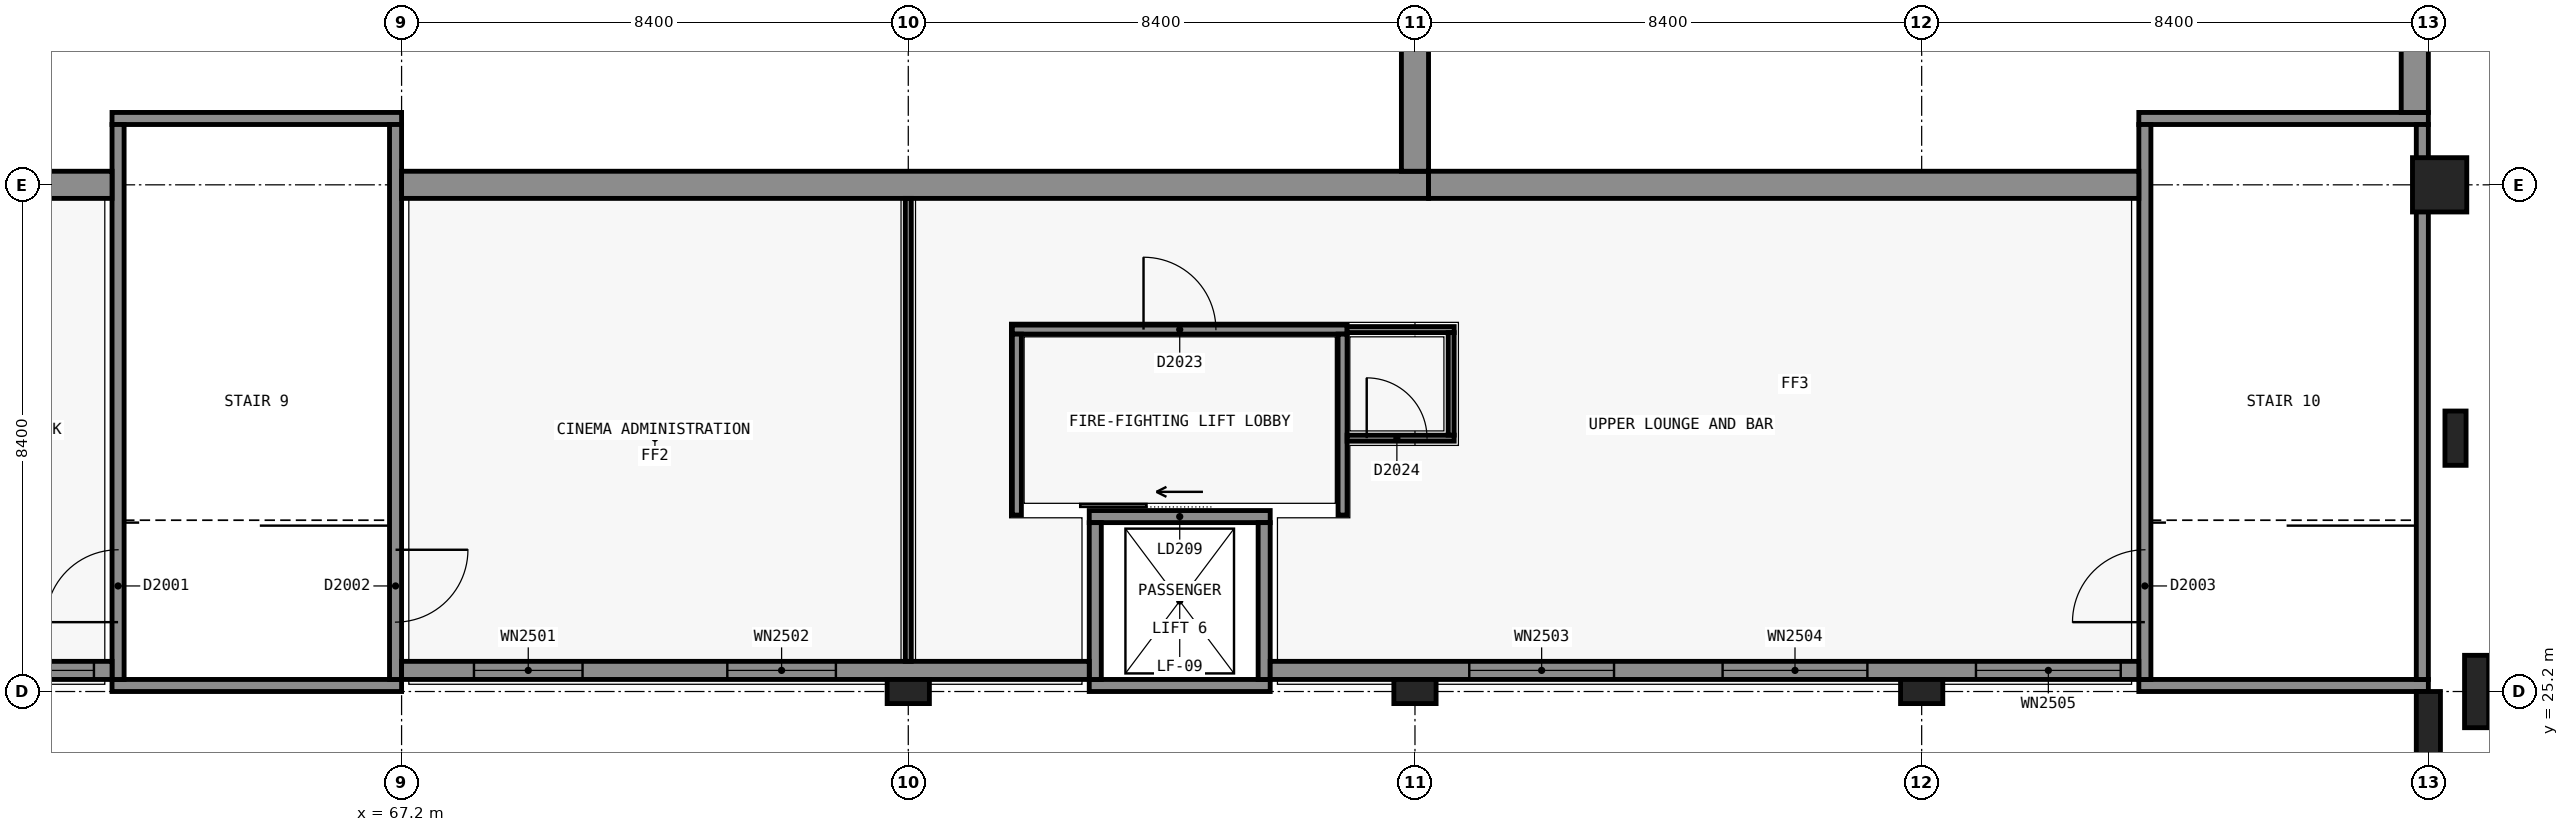
"""IFC4 building model, lengths in metres.
Left out: names, types, materials, properties, quantities, classifications, styles, units other than length and angle.
Written with IfcOpenShell. Run it as: python <this file> out.ifc"""

import sys

from ifc_helpers import new_model, si_unit, direction, frame, frame_2d, origin, origin_2d, place, context, subcontext, project, spatial, rectangle, extrude, element, fill, save


model = new_model("IFC4")
c1 = context("Model", 3, precision=1e-05, world=origin(), true_north=direction((0.0, 1.0)))
c2 = subcontext(c1, "Body", "Model", "MODEL_VIEW")
j1 = project(units=[si_unit("LENGTHUNIT", "METRE"), si_unit("PLANEANGLEUNIT", "RADIAN")], contexts=[c1])
p1 = place(None, origin())
s1 = spatial("IfcSite", under=j1, at=p1, CompositionType="ELEMENT")
p2 = place(p1, origin())
s2 = spatial("IfcBuilding", under=s1, at=p2, CompositionType="ELEMENT")
p3 = place(p2, frame((0.0, 0.0, 10.2)))
s3 = spatial("IfcBuildingStorey", under=s2, at=p3, CompositionType="ELEMENT", Elevation=10.2)
for number, where, z_axis, x_axis in (
    (1, (67.2, 25.3, 0.0), (0.0, 0.0, 1.0), (-1.0, 0.0, 0.0)),
    (2, (62.4, 34.7, 0.0), (0.0, 0.0, 1.0), (1.0, 0.0, 0.0)),
):
    element("IfcWall", number, at=place(p3, frame(where, z_axis=z_axis, x_axis=x_axis)), inside=s3, PredefinedType="SHEAR", context=c2, shape_type="SweptSolid", body=[
        extrude(rectangle(XDim=4.8, YDim=0.2, at=frame_2d((2.4, 0.0))), origin(), (0.0, 0.0, 1.0), 4.8),
    ])
p4 = place(p3, frame((62.5, 25.4, 0.0), z_axis=(0.0, 0.0, 1.0), x_axis=(0.0, 1.0, 0.0)))
e3 = element("IfcWall", 3, at=p4, inside=s3, PredefinedType="SHEAR", context=c2, shape_type="SweptSolid", body=[
    extrude(rectangle(XDim=9.2, YDim=0.2, at=frame_2d((4.6, 0.0))), origin(), (0.0, 0.0, 1.0), 4.8),
])
p5 = place(p4, frame((0.95, 0.0, 0.0)))
e4 = element("IfcOpeningElement", 4, at=p5, cuts=e3, PredefinedType="OPENING", context=c2, shape_type="SweptSolid", body=[
    extrude(rectangle(XDim=1.2, YDim=2.1, at=frame_2d((0.6, 1.05))), frame((0.0, 0.11, 0.0), z_axis=(0.0, -1.0, 0.0), x_axis=(1.0, 0.0, 0.0)), (0.0, 0.0, 1.0), 0.22),
])
p6 = place(p3, frame((67.1, 34.6, 0.0), z_axis=(0.0, 0.0, 1.0), x_axis=(0.0, -1.0, 0.0)))
e5 = element("IfcWall", 5, at=p6, inside=s3, PredefinedType="SHEAR", context=c2, shape_type="SweptSolid", body=[
    extrude(rectangle(XDim=9.2, YDim=0.2, at=frame_2d((4.6, 0.0))), origin(), (0.0, 0.0, 1.0), 4.8),
])
p7 = place(p6, frame((7.05, 0.0, 0.0)))
e6 = element("IfcOpeningElement", 6, at=p7, cuts=e5, PredefinedType="OPENING", context=c2, shape_type="SweptSolid", body=[
    extrude(rectangle(XDim=1.2, YDim=2.1, at=frame_2d((0.6, 1.05))), frame((0.0, 0.11, 0.0), z_axis=(0.0, -1.0, 0.0), x_axis=(1.0, 0.0, 0.0)), (0.0, 0.0, 1.0), 0.22),
])
for number, where, z_axis, x_axis in (
    (7, (100.8, 25.3, 0.0), (0.0, 0.0, 1.0), (-1.0, 0.0, 0.0)),
    (8, (96.0, 34.7, 0.0), (0.0, 0.0, 1.0), (1.0, 0.0, 0.0)),
):
    element("IfcWall", number, at=place(p3, frame(where, z_axis=z_axis, x_axis=x_axis)), inside=s3, PredefinedType="SHEAR", context=c2, shape_type="SweptSolid", body=[
        extrude(rectangle(XDim=4.8, YDim=0.2, at=frame_2d((2.4, 0.0))), origin(), (0.0, 0.0, 1.0), 4.8),
    ])
p8 = place(p3, frame((96.1, 25.4, 0.0), z_axis=(0.0, 0.0, 1.0), x_axis=(0.0, 1.0, 0.0)))
e9 = element("IfcWall", 9, at=p8, inside=s3, PredefinedType="SHEAR", context=c2, shape_type="SweptSolid", body=[
    extrude(rectangle(XDim=9.2, YDim=0.2, at=frame_2d((4.6, 0.0))), origin(), (0.0, 0.0, 1.0), 4.8),
])
p9 = place(p8, frame((0.95, 0.0, 0.0)))
e10 = element("IfcOpeningElement", 10, at=p9, cuts=e9, PredefinedType="OPENING", context=c2, shape_type="SweptSolid", body=[
    extrude(rectangle(XDim=1.2, YDim=2.1, at=frame_2d((0.6, 1.05))), frame((0.0, 0.11, 0.0), z_axis=(0.0, -1.0, 0.0), x_axis=(1.0, 0.0, 0.0)), (0.0, 0.0, 1.0), 0.22),
])
p10 = place(p3, frame((100.7, 34.6, 0.0), z_axis=(0.0, 0.0, 1.0), x_axis=(0.0, -1.0, 0.0)))
e11 = element("IfcWall", 11, at=p10, inside=s3, PredefinedType="SHEAR", context=c2, shape_type="SweptSolid", body=[
    extrude(rectangle(XDim=9.2, YDim=0.2, at=frame_2d((4.6, 0.0))), origin(), (0.0, 0.0, 1.0), 4.8),
])
p11 = place(p3, frame((81.6, 25.3, 0.0), z_axis=(0.0, 0.0, 1.0), x_axis=(-1.0, 0.0, 0.0)))
e12 = element("IfcWall", 12, at=p11, inside=s3, PredefinedType="SHEAR", context=c2, shape_type="SweptSolid", body=[
    extrude(rectangle(XDim=3.0, YDim=0.2, at=frame_2d((1.5, 0.0))), origin(), (0.0, 0.0, 1.0), 4.8),
])
p12 = place(p3, frame((78.6, 28.1, 0.0), z_axis=(0.0, 0.0, 1.0), x_axis=(1.0, 0.0, 0.0)))
e13 = element("IfcWall", 13, at=p12, inside=s3, PredefinedType="SHEAR", context=c2, shape_type="SweptSolid", body=[
    extrude(rectangle(XDim=3.0, YDim=0.2, at=frame_2d((1.5, 0.0))), origin(), (0.0, 0.0, 1.0), 4.8),
])
p13 = place(p12, frame((0.95, 0.0, 0.0)))
e14 = element("IfcOpeningElement", 14, at=p13, cuts=e13, PredefinedType="OPENING", context=c2, shape_type="SweptSolid", body=[
    extrude(rectangle(XDim=1.1, YDim=2.1, at=frame_2d((0.55, 1.05))), frame((0.0, 0.11, 0.0), z_axis=(0.0, -1.0, 0.0), x_axis=(1.0, 0.0, 0.0)), (0.0, 0.0, 1.0), 0.22),
])
for number, where, z_axis, x_axis in (
    (15, (78.7, 25.4, 0.0), (0.0, 0.0, 1.0), (0.0, 1.0, 0.0)),
    (16, (81.5, 28.0, 0.0), (0.0, 0.0, 1.0), (0.0, -1.0, 0.0)),
):
    element("IfcWall", number, at=place(p3, frame(where, z_axis=z_axis, x_axis=x_axis)), inside=s3, PredefinedType="SHEAR", context=c2, shape_type="SweptSolid", body=[
        extrude(rectangle(XDim=2.6, YDim=0.2, at=frame_2d((1.3, 0.0))), origin(), (0.0, 0.0, 1.0), 4.8),
    ])
p14 = place(p3, frame((62.4, 33.6, 0.0), z_axis=(0.0, 0.0, 1.0), x_axis=(-1.0, 0.0, 0.0)))
e17 = element("IfcWall", 17, at=p14, inside=s3, PredefinedType="SHEAR", context=c2, shape_type="SweptSolid", body=[
    extrude(rectangle(XDim=3.6, YDim=0.45, at=frame_2d((1.8, 0.0))), origin(), (0.0, 0.0, 1.0), 4.8),
])
p15 = place(p3, frame((84.225, 33.6, 0.0), z_axis=(0.0, 0.0, 1.0), x_axis=(-1.0, 0.0, 0.0)))
e18 = element("IfcWall", 18, at=p15, inside=s3, PredefinedType="SHEAR", context=c2, shape_type="SweptSolid", body=[
    extrude(rectangle(XDim=17.025, YDim=0.45, at=frame_2d((8.513, 0.0))), origin(), (0.0, 0.0, 1.0), 4.8),
])
p16 = place(p3, frame((84.0, 58.575, 0.0), z_axis=(0.0, 0.0, 1.0), x_axis=(0.0, -1.0, 0.0)))
e19 = element("IfcWall", 19, at=p16, inside=s3, PredefinedType="SHEAR", context=c2, shape_type="SweptSolid", body=[
    extrude(rectangle(XDim=24.75, YDim=0.45, at=frame_2d((12.375, 0.0))), origin(), (0.0, 0.0, 1.0), 4.8),
])
p17 = place(p3, frame((96.0, 33.6, 0.0), z_axis=(0.0, 0.0, 1.0), x_axis=(-1.0, 0.0, 0.0)))
e20 = element("IfcWall", 20, at=p17, inside=s3, PredefinedType="SHEAR", context=c2, shape_type="SweptSolid", body=[
    extrude(rectangle(XDim=11.775, YDim=0.45, at=frame_2d((5.887, 0.0))), origin(), (0.0, 0.0, 1.0), 4.8),
])
p18 = place(p3, frame((100.575, 57.6, 0.0), z_axis=(0.0, 0.0, 1.0), x_axis=(0.0, -1.0, 0.0)))
e21 = element("IfcWall", 21, at=p18, inside=s3, PredefinedType="SHEAR", context=c2, shape_type="SweptSolid", body=[
    extrude(rectangle(XDim=22.8, YDim=0.45, at=frame_2d((11.4, 0.0))), origin(), (0.0, 0.0, 1.0), 4.8),
])
for number, where, z_axis, x_axis in (
    (22, (75.6, 25.2, 0.0), (0.0, 0.0, 1.0), (1.0, 0.0, 0.0)),
    (23, (84.0, 25.2, 0.0), (0.0, 0.0, 1.0), (1.0, 0.0, 0.0)),
    (24, (92.4, 25.2, 0.0), (0.0, 0.0, 1.0), (1.0, 0.0, 0.0)),
):
    element("IfcColumn", number, at=place(p3, frame(where, z_axis=z_axis, x_axis=x_axis)), inside=s3, PredefinedType="COLUMN", context=c2, shape_type="SweptSolid", body=[
        extrude(rectangle(XDim=0.7, YDim=0.4, at=origin_2d()), origin(), (0.0, 0.0, 1.0), 4.8),
    ])
p19 = place(p3, frame((100.987, 33.6, 3.8), z_axis=(0.0, 0.0, 1.0), x_axis=(1.0, 0.0, 0.0)))
e25 = element("IfcColumn", 25, at=p19, inside=s3, PredefinedType="COLUMN", context=c2, shape_type="SweptSolid", body=[
    extrude(rectangle(XDim=0.9, YDim=0.9, at=origin_2d()), origin(), (0.0, 0.0, 1.0), 1.0),
])
p20 = place(p3, frame((62.4, 25.55, 0.0), z_axis=(0.0, 0.0, 1.0), x_axis=(-1.0, 0.0, 0.0)))
e26 = element("IfcWall", 26, at=p20, inside=s3, PredefinedType="SOLIDWALL", context=c2, shape_type="SweptSolid", body=[
    extrude(rectangle(XDim=3.2, YDim=0.3, at=frame_2d((1.6, 0.0))), origin(), (0.0, 0.0, 1.0), 4.8),
])
p21 = place(p20, frame((0.3, 0.0, 0.9)))
e27 = element("IfcOpeningElement", 27, at=p21, cuts=e26, PredefinedType="OPENING", context=c2, shape_type="SweptSolid", body=[
    extrude(rectangle(XDim=2.4, YDim=1.8, at=frame_2d((1.2, 0.9))), frame((0.0, 0.16, 0.0), z_axis=(0.0, -1.0, 0.0), x_axis=(1.0, 0.0, 0.0)), (0.0, 0.0, 1.0), 0.32),
])
p22 = place(p3, frame((78.6, 25.55, 0.0), z_axis=(0.0, 0.0, 1.0), x_axis=(-1.0, 0.0, 0.0)))
e28 = element("IfcWall", 28, at=p22, inside=s3, PredefinedType="SOLIDWALL", context=c2, shape_type="SweptSolid", body=[
    extrude(rectangle(XDim=11.4, YDim=0.3, at=frame_2d((5.7, 0.0))), origin(), (0.0, 0.0, 1.0), 4.8),
])
p23 = place(p22, frame((8.4, 0.0, 0.9)))
e29 = element("IfcOpeningElement", 29, at=p23, cuts=e28, PredefinedType="OPENING", context=c2, shape_type="SweptSolid", body=[
    extrude(rectangle(XDim=1.8, YDim=1.5, at=frame_2d((0.9, 0.75))), frame((0.0, 0.16, 0.0), z_axis=(0.0, -1.0, 0.0), x_axis=(1.0, 0.0, 0.0)), (0.0, 0.0, 1.0), 0.32),
])
p24 = place(p22, frame((4.2, 0.0, 0.9)))
e30 = element("IfcOpeningElement", 30, at=p24, cuts=e28, PredefinedType="OPENING", context=c2, shape_type="SweptSolid", body=[
    extrude(rectangle(XDim=1.8, YDim=1.5, at=frame_2d((0.9, 0.75))), frame((0.0, 0.16, 0.0), z_axis=(0.0, -1.0, 0.0), x_axis=(1.0, 0.0, 0.0)), (0.0, 0.0, 1.0), 0.32),
])
p25 = place(p3, frame((96.0, 25.55, 0.0), z_axis=(0.0, 0.0, 1.0), x_axis=(-1.0, 0.0, 0.0)))
e31 = element("IfcWall", 31, at=p25, inside=s3, PredefinedType="SOLIDWALL", context=c2, shape_type="SweptSolid", body=[
    extrude(rectangle(XDim=14.4, YDim=0.3, at=frame_2d((7.2, 0.0))), origin(), (0.0, 0.0, 1.0), 4.8),
])
p26 = place(p25, frame((8.7, 0.0, 0.9)))
e32 = element("IfcOpeningElement", 32, at=p26, cuts=e31, PredefinedType="OPENING", context=c2, shape_type="SweptSolid", body=[
    extrude(rectangle(XDim=2.4, YDim=1.8, at=frame_2d((1.2, 0.9))), frame((0.0, 0.16, 0.0), z_axis=(0.0, -1.0, 0.0), x_axis=(1.0, 0.0, 0.0)), (0.0, 0.0, 1.0), 0.32),
])
p27 = place(p25, frame((4.5, 0.0, 0.9)))
e33 = element("IfcOpeningElement", 33, at=p27, cuts=e31, PredefinedType="OPENING", context=c2, shape_type="SweptSolid", body=[
    extrude(rectangle(XDim=2.4, YDim=1.8, at=frame_2d((1.2, 0.9))), frame((0.0, 0.16, 0.0), z_axis=(0.0, -1.0, 0.0), x_axis=(1.0, 0.0, 0.0)), (0.0, 0.0, 1.0), 0.32),
])
p28 = place(p25, frame((0.3, 0.0, 0.9)))
e34 = element("IfcOpeningElement", 34, at=p28, cuts=e31, PredefinedType="OPENING", context=c2, shape_type="SweptSolid", body=[
    extrude(rectangle(XDim=2.4, YDim=1.8, at=frame_2d((1.2, 0.9))), frame((0.0, 0.16, 0.0), z_axis=(0.0, -1.0, 0.0), x_axis=(1.0, 0.0, 0.0)), (0.0, 0.0, 1.0), 0.32),
])
for number, where, z_axis, x_axis in (
    (35, (100.8, 24.6, 0.0), (0.0, 0.0, 1.0), (1.0, 0.0, 0.0)),
    (36, (101.6, 25.2, 0.0), (0.0, 0.0, 1.0), (0.0, 1.0, 0.0)),
):
    element("IfcColumn", number, at=place(p3, frame(where, z_axis=z_axis, x_axis=x_axis)), inside=s3, PredefinedType="PILASTER", context=c2, shape_type="SweptSolid", body=[
        extrude(rectangle(XDim=0.4, YDim=1.2, at=origin_2d()), origin(), (0.0, 0.0, 1.0), 4.8),
    ])
p29 = place(p3, frame((101.25, 29.4, 0.0), z_axis=(0.0, 0.0, 1.0), x_axis=(0.0, 1.0, 0.0)))
e37 = element("IfcColumn", 37, at=p29, inside=s3, PredefinedType="PILASTER", context=c2, shape_type="SweptSolid", body=[
    extrude(rectangle(XDim=0.35, YDim=0.9, at=origin_2d()), origin(), (0.0, 0.0, 1.0), 4.8),
])
p30 = place(p3, frame((77.325, 31.2, 0.0), z_axis=(0.0, 0.0, 1.0), x_axis=(1.0, 0.0, 0.0)))
e38 = element("IfcWall", 38, at=p30, inside=s3, PredefinedType="SOLIDWALL", context=c2, shape_type="SweptSolid", body=[
    extrude(rectangle(XDim=5.55, YDim=0.15, at=frame_2d((2.775, 0.0))), origin(), (0.0, 0.0, 1.0), 4.5),
])
p31 = place(p30, frame((2.175, 0.0, 0.0)))
e39 = element("IfcOpeningElement", 39, at=p31, cuts=e38, PredefinedType="OPENING", context=c2, shape_type="SweptSolid", body=[
    extrude(rectangle(XDim=1.2, YDim=2.1, at=frame_2d((0.6, 1.05))), frame((0.0, 0.085, 0.0), z_axis=(0.0, -1.0, 0.0), x_axis=(1.0, 0.0, 0.0)), (0.0, 0.0, 1.0), 0.17),
])
for number, where, z_axis, x_axis in (
    (40, (77.4, 28.125, 0.0), (0.0, 0.0, 1.0), (0.0, 1.0, 0.0)),
    (41, (82.8, 28.125, 0.0), (0.0, 0.0, 1.0), (0.0, 1.0, 0.0)),
):
    element("IfcWall", number, at=place(p3, frame(where, z_axis=z_axis, x_axis=x_axis)), inside=s3, PredefinedType="SOLIDWALL", context=c2, shape_type="SweptSolid", body=[
        extrude(rectangle(XDim=3.0, YDim=0.15, at=frame_2d((1.5, 0.0))), origin(), (0.0, 0.0, 1.0), 4.5),
    ])
p32 = place(p3, frame((82.875, 29.4, 0.0), z_axis=(0.0, 0.0, 1.0), x_axis=(1.0, 0.0, 0.0)))
e42 = element("IfcWall", 42, at=p32, inside=s3, PredefinedType="PARTITIONING", context=c2, shape_type="SweptSolid", body=[
    extrude(rectangle(XDim=1.775, YDim=0.1, at=frame_2d((0.887, 0.0))), origin(), (0.0, 0.0, 1.0), 4.5),
])
p33 = place(p32, frame((0.325, 0.0, 0.0)))
e43 = element("IfcOpeningElement", 43, at=p33, cuts=e42, PredefinedType="OPENING", context=c2, shape_type="SweptSolid", body=[
    extrude(rectangle(XDim=1.0, YDim=2.1, at=frame_2d((0.5, 1.05))), frame((0.0, 0.06, 0.0), z_axis=(0.0, -1.0, 0.0), x_axis=(1.0, 0.0, 0.0)), (0.0, 0.0, 1.0), 0.12),
])
p34 = place(p3, frame((82.875, 31.2, 0.0), z_axis=(0.0, 0.0, 1.0), x_axis=(1.0, 0.0, 0.0)))
e44 = element("IfcWall", 44, at=p34, inside=s3, PredefinedType="PARTITIONING", context=c2, shape_type="SweptSolid", body=[
    extrude(rectangle(XDim=1.775, YDim=0.1, at=frame_2d((0.887, 0.0))), origin(), (0.0, 0.0, 1.0), 4.5),
])
p35 = place(p3, frame((75.6, 25.15, 0.0), z_axis=(0.0, 0.0, 1.0), x_axis=(0.0, 1.0, 0.0)))
e45 = element("IfcWall", 45, at=p35, inside=s3, PredefinedType="PARTITIONING", context=c2, shape_type="SweptSolid", body=[
    extrude(rectangle(XDim=0.25, YDim=0.1, at=frame_2d((0.125, 0.0))), origin(), (0.0, 0.0, 1.0), 4.5),
])
p36 = place(p3, frame((75.6, 25.7, 0.0), z_axis=(0.0, 0.0, 1.0), x_axis=(0.0, 1.0, 0.0)))
e46 = element("IfcWall", 46, at=p36, inside=s3, PredefinedType="PARTITIONING", context=c2, shape_type="SweptSolid", body=[
    extrude(rectangle(XDim=7.675, YDim=0.1, at=frame_2d((3.837, 0.0))), origin(), (0.0, 0.0, 1.0), 4.5),
])
p37 = place(p3, frame((84.6, 29.45, 0.0), z_axis=(0.0, 0.0, 1.0), x_axis=(0.0, 1.0, 0.0)))
e47 = element("IfcWall", 47, at=p37, inside=s3, PredefinedType="PARTITIONING", context=c2, shape_type="SweptSolid", body=[
    extrude(rectangle(XDim=1.7, YDim=0.1, at=frame_2d((0.85, 0.0))), origin(), (0.0, 0.0, 1.0), 4.5),
])
p38 = place(p21, origin())
e48 = element("IfcWindow", 48, at=p38, inside=s3, PartitioningType="SINGLE_PANEL", PredefinedType="WINDOW", context=c2, shape_type="SweptSolid", body=[
    extrude(rectangle(XDim=2.4, YDim=1.8, at=frame_2d((1.2, 0.9))), frame((0.0, 0.03, 0.0), z_axis=(0.0, -1.0, 0.0), x_axis=(1.0, 0.0, 0.0)), (0.0, 0.0, 1.0), 0.06),
])
fill(e27, e48)
p39 = place(p23, origin())
e49 = element("IfcWindow", 49, at=p39, inside=s3, PartitioningType="SINGLE_PANEL", PredefinedType="WINDOW", context=c2, shape_type="SweptSolid", body=[
    extrude(rectangle(XDim=1.8, YDim=1.5, at=frame_2d((0.9, 0.75))), frame((0.0, 0.03, 0.0), z_axis=(0.0, -1.0, 0.0), x_axis=(1.0, 0.0, 0.0)), (0.0, 0.0, 1.0), 0.06),
])
fill(e29, e49)
p40 = place(p24, origin())
e50 = element("IfcWindow", 50, at=p40, inside=s3, PartitioningType="SINGLE_PANEL", PredefinedType="WINDOW", context=c2, shape_type="SweptSolid", body=[
    extrude(rectangle(XDim=1.8, YDim=1.5, at=frame_2d((0.9, 0.75))), frame((0.0, 0.03, 0.0), z_axis=(0.0, -1.0, 0.0), x_axis=(1.0, 0.0, 0.0)), (0.0, 0.0, 1.0), 0.06),
])
fill(e30, e50)
p41 = place(p26, origin())
e51 = element("IfcWindow", 51, at=p41, inside=s3, PartitioningType="SINGLE_PANEL", PredefinedType="WINDOW", context=c2, shape_type="SweptSolid", body=[
    extrude(rectangle(XDim=2.4, YDim=1.8, at=frame_2d((1.2, 0.9))), frame((0.0, 0.03, 0.0), z_axis=(0.0, -1.0, 0.0), x_axis=(1.0, 0.0, 0.0)), (0.0, 0.0, 1.0), 0.06),
])
fill(e32, e51)
p42 = place(p27, origin())
e52 = element("IfcWindow", 52, at=p42, inside=s3, PartitioningType="SINGLE_PANEL", PredefinedType="WINDOW", context=c2, shape_type="SweptSolid", body=[
    extrude(rectangle(XDim=2.4, YDim=1.8, at=frame_2d((1.2, 0.9))), frame((0.0, 0.03, 0.0), z_axis=(0.0, -1.0, 0.0), x_axis=(1.0, 0.0, 0.0)), (0.0, 0.0, 1.0), 0.06),
])
fill(e33, e52)
p43 = place(p28, origin())
e53 = element("IfcWindow", 53, at=p43, inside=s3, PartitioningType="SINGLE_PANEL", PredefinedType="WINDOW", context=c2, shape_type="SweptSolid", body=[
    extrude(rectangle(XDim=2.4, YDim=1.8, at=frame_2d((1.2, 0.9))), frame((0.0, 0.03, 0.0), z_axis=(0.0, -1.0, 0.0), x_axis=(1.0, 0.0, 0.0)), (0.0, 0.0, 1.0), 0.06),
])
fill(e34, e53)
p44 = place(p13, origin())
e54 = element("IfcDoor", 54, at=p44, inside=s3, OperationType="SLIDING_TO_LEFT", PredefinedType="DOOR", context=c2, shape_type="SweptSolid", body=[
    extrude(rectangle(XDim=1.1, YDim=2.1, at=frame_2d((0.55, 1.05))), frame((0.0, 0.025, 0.0), z_axis=(0.0, -1.0, 0.0), x_axis=(1.0, 0.0, 0.0)), (0.0, 0.0, 1.0), 0.05),
])
fill(e14, e54)
p45 = place(p5, origin())
e55 = element("IfcDoor", 55, at=p45, inside=s3, OperationType="SINGLE_SWING_LEFT", PredefinedType="DOOR", context=c2, shape_type="SweptSolid", body=[
    extrude(rectangle(XDim=1.2, YDim=2.1, at=frame_2d((0.6, 1.05))), frame((0.0, 0.025, 0.0), z_axis=(0.0, -1.0, 0.0), x_axis=(1.0, 0.0, 0.0)), (0.0, 0.0, 1.0), 0.05),
])
fill(e4, e55)
p46 = place(p7, origin())
e56 = element("IfcDoor", 56, at=p46, inside=s3, OperationType="SINGLE_SWING_LEFT", PredefinedType="DOOR", context=c2, shape_type="SweptSolid", body=[
    extrude(rectangle(XDim=1.2, YDim=2.1, at=frame_2d((0.6, 1.05))), frame((0.0, 0.025, 0.0), z_axis=(0.0, -1.0, 0.0), x_axis=(1.0, 0.0, 0.0)), (0.0, 0.0, 1.0), 0.05),
])
fill(e6, e56)
p47 = place(p9, origin())
e57 = element("IfcDoor", 57, at=p47, inside=s3, OperationType="SINGLE_SWING_LEFT", PredefinedType="DOOR", context=c2, shape_type="SweptSolid", body=[
    extrude(rectangle(XDim=1.2, YDim=2.1, at=frame_2d((0.6, 1.05))), frame((0.0, 0.025, 0.0), z_axis=(0.0, -1.0, 0.0), x_axis=(1.0, 0.0, 0.0)), (0.0, 0.0, 1.0), 0.05),
])
fill(e10, e57)
p48 = place(p31, origin())
e58 = element("IfcDoor", 58, at=p48, inside=s3, OperationType="SINGLE_SWING_LEFT", PredefinedType="DOOR", context=c2, shape_type="SweptSolid", body=[
    extrude(rectangle(XDim=1.2, YDim=2.1, at=frame_2d((0.6, 1.05))), frame((0.0, 0.025, 0.0), z_axis=(0.0, -1.0, 0.0), x_axis=(1.0, 0.0, 0.0)), (0.0, 0.0, 1.0), 0.05),
])
fill(e39, e58)
p49 = place(p33, origin())
e59 = element("IfcDoor", 59, at=p49, inside=s3, OperationType="SINGLE_SWING_LEFT", PredefinedType="DOOR", context=c2, shape_type="SweptSolid", body=[
    extrude(rectangle(XDim=1.0, YDim=2.1, at=frame_2d((0.5, 1.05))), frame((0.0, 0.025, 0.0), z_axis=(0.0, -1.0, 0.0), x_axis=(1.0, 0.0, 0.0)), (0.0, 0.0, 1.0), 0.05),
])
fill(e43, e59)
save(model, sys.argv[1])
